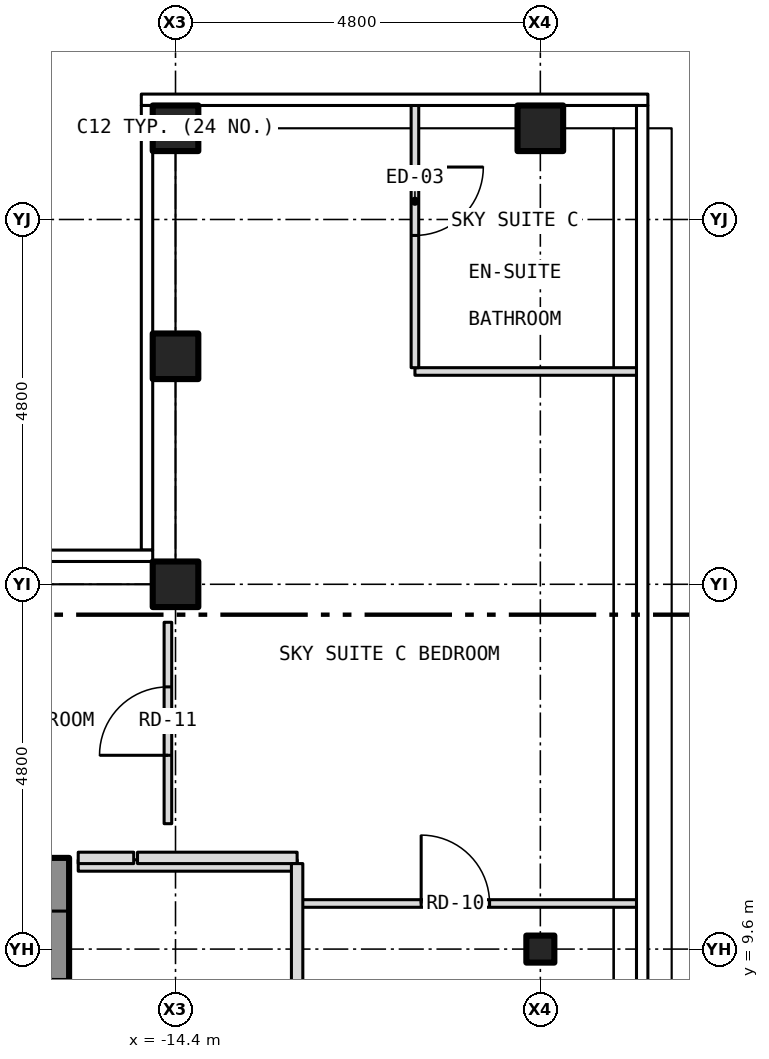
"""IFC4 building model, lengths in metres.
Left out: names, types, materials, properties, quantities, classifications, styles, units other than length and angle.
Written with IfcOpenShell. Run it as: python <this file> out.ifc"""

import sys

from ifc_helpers import new_model, si_unit, direction, frame, frame_2d, origin, origin_2d, place, context, subcontext, project, spatial, rectangle, hollow_rectangle, i_section, extrude, element, fill, save


model = new_model("IFC4")
c1 = context("Model", 3, precision=1e-05, world=origin(), true_north=direction((0.0, 1.0)))
c2 = subcontext(c1, "Body", "Model", "MODEL_VIEW")
j1 = project(units=[si_unit("LENGTHUNIT", "METRE"), si_unit("PLANEANGLEUNIT", "RADIAN")], contexts=[c1])
p1 = place(None, origin())
s1 = spatial("IfcSite", under=j1, at=p1, CompositionType="ELEMENT")
p2 = place(p1, origin())
s2 = spatial("IfcBuilding", under=s1, at=p2, CompositionType="ELEMENT")
p3 = place(p2, frame((0.0, 0.0, 272.5)))
s3 = spatial("IfcBuildingStorey", under=s2, at=p3, CompositionType="ELEMENT", Elevation=272.5)
for number, where, z_axis, x_axis in (
    (1, (-14.4, 20.4, -0.15), (0.0, 0.0, 1.0), (1.0, 0.0, 0.0)),
    (2, (-9.6, 20.4, -0.15), (0.0, 0.0, 1.0), (1.0, 0.0, 0.0)),
    (3, (-14.4, 14.4, -0.15), (0.0, 0.0, 1.0), (1.0, 0.0, 0.0)),
    (4, (-14.4, 17.4, -0.15), (0.0, 0.0, 1.0), (1.0, 0.0, 0.0)),
):
    element("IfcColumn", number, at=place(p3, frame(where, z_axis=z_axis, x_axis=x_axis)), inside=s3, PredefinedType="COLUMN", context=c2, shape_type="SweptSolid", body=[
        extrude(hollow_rectangle(XDim=0.6, YDim=0.6, WallThickness=0.03, at=origin_2d()), origin(), (0.0, 0.0, 1.0), 3.5),
    ])
p4 = place(p3, frame((-9.6, 9.6, -0.15), z_axis=(0.0, 0.0, 1.0), x_axis=(1.0, 0.0, 0.0)))
e5 = element("IfcColumn", 5, at=p4, inside=s3, PredefinedType="COLUMN", context=c2, shape_type="SweptSolid", body=[
    extrude(i_section(OverallWidth=0.368, OverallDepth=0.356, WebThickness=0.011, FlangeThickness=0.018, at=origin_2d()), origin(), (0.0, 0.0, 1.0), 3.5),
])
p5 = place(p3, frame((-16.0, -10.8, 0.0), z_axis=(0.0, 0.0, 1.0), x_axis=(0.0, 1.0, 0.0)))
e6 = element("IfcWall", 6, at=p5, inside=s3, PredefinedType="SHEAR", context=c2, shape_type="SweptSolid", body=[
    extrude(rectangle(XDim=21.6, YDim=0.4, at=frame_2d((10.8, 0.0))), origin(), (0.0, 0.0, 1.0), 3.25),
])
p6 = place(p5, frame((9.4, 0.0, 0.0)))
e7 = element("IfcOpeningElement", 7, at=p6, cuts=e6, PredefinedType="OPENING", context=c2, shape_type="SweptSolid", body=[
    extrude(rectangle(XDim=1.1, YDim=2.1, at=frame_2d((0.55, 1.05))), frame((0.0, 0.212, 0.0), z_axis=(0.0, -1.0, 0.0), x_axis=(1.0, 0.0, 0.0)), (0.0, 0.0, 1.0), 0.424),
])
p7 = place(p5, frame((11.5, 0.0, 0.0)))
e8 = element("IfcOpeningElement", 8, at=p7, cuts=e6, PredefinedType="OPENING", context=c2, shape_type="SweptSolid", body=[
    extrude(rectangle(XDim=1.1, YDim=2.1, at=frame_2d((0.55, 1.05))), frame((0.0, 0.212, 0.0), z_axis=(0.0, -1.0, 0.0), x_axis=(1.0, 0.0, 0.0)), (0.0, 0.0, 1.0), 0.424),
])
p8 = place(p5, frame((13.6, 0.0, 0.0)))
e9 = element("IfcOpeningElement", 9, at=p8, cuts=e6, PredefinedType="OPENING", context=c2, shape_type="SweptSolid", body=[
    extrude(rectangle(XDim=1.1, YDim=2.1, at=frame_2d((0.55, 1.05))), frame((0.0, 0.212, 0.0), z_axis=(0.0, -1.0, 0.0), x_axis=(1.0, 0.0, 0.0)), (0.0, 0.0, 1.0), 0.424),
])
p9 = place(p5, frame((15.7, 0.0, 0.0)))
e10 = element("IfcOpeningElement", 10, at=p9, cuts=e6, PredefinedType="OPENING", context=c2, shape_type="SweptSolid", body=[
    extrude(rectangle(XDim=1.1, YDim=2.1, at=frame_2d((0.55, 1.05))), frame((0.0, 0.212, 0.0), z_axis=(0.0, -1.0, 0.0), x_axis=(1.0, 0.0, 0.0)), (0.0, 0.0, 1.0), 0.424),
])
p10 = place(p5, frame((17.8, 0.0, 0.0)))
e11 = element("IfcOpeningElement", 11, at=p10, cuts=e6, PredefinedType="OPENING", context=c2, shape_type="SweptSolid", body=[
    extrude(rectangle(XDim=1.1, YDim=2.1, at=frame_2d((0.55, 1.05))), frame((0.0, 0.212, 0.0), z_axis=(0.0, -1.0, 0.0), x_axis=(1.0, 0.0, 0.0)), (0.0, 0.0, 1.0), 0.424),
])
p11 = place(p5, frame((0.458, 0.0, 0.0)))
e12 = element("IfcOpeningElement", 12, at=p11, cuts=e6, PredefinedType="OPENING", context=c2, shape_type="SweptSolid", body=[
    extrude(rectangle(XDim=1.1, YDim=2.1, at=frame_2d((0.55, 1.05))), frame((0.0, 0.212, 0.0), z_axis=(0.0, -1.0, 0.0), x_axis=(1.0, 0.0, 0.0)), (0.0, 0.0, 1.0), 0.424),
])
p12 = place(p5, frame((7.5, 0.0, 0.0)))
e13 = element("IfcOpeningElement", 13, at=p12, cuts=e6, PredefinedType="OPENING", context=c2, shape_type="SweptSolid", body=[
    extrude(rectangle(XDim=1.1, YDim=2.1, at=frame_2d((0.55, 1.05))), frame((0.0, 0.212, 0.0), z_axis=(0.0, -1.0, 0.0), x_axis=(1.0, 0.0, 0.0)), (0.0, 0.0, 1.0), 0.424),
])
p13 = place(p5, frame((20.0, 0.0, 0.0)))
e14 = element("IfcOpeningElement", 14, at=p13, cuts=e6, PredefinedType="OPENING", context=c2, shape_type="SweptSolid", body=[
    extrude(rectangle(XDim=0.9, YDim=2.1, at=frame_2d((0.45, 1.05))), frame((0.0, 0.212, 0.0), z_axis=(0.0, -1.0, 0.0), x_axis=(1.0, 0.0, 0.0)), (0.0, 0.0, 1.0), 0.424),
])
p14 = place(p3, frame((-12.8, 10.2, 0.0), z_axis=(0.0, 0.0, 1.0), x_axis=(1.0, 0.0, 0.0)))
e15 = element("IfcWall", 15, at=p14, inside=s3, PredefinedType="PARTITIONING", context=c2, shape_type="SweptSolid", body=[
    extrude(rectangle(XDim=4.495, YDim=0.1, at=frame_2d((2.248, 0.0))), origin(), (0.0, 0.0, 1.0), 3.35),
])
p15 = place(p14, frame((1.632, 0.0, 0.0)))
e16 = element("IfcOpeningElement", 16, at=p15, cuts=e15, PredefinedType="OPENING", context=c2, shape_type="SweptSolid", body=[
    extrude(rectangle(XDim=0.9, YDim=2.1, at=frame_2d((0.45, 1.05))), frame((0.0, 0.062, 0.0), z_axis=(0.0, -1.0, 0.0), x_axis=(1.0, 0.0, 0.0)), (0.0, 0.0, 1.0), 0.124),
])
p16 = place(p3, frame((-15.68, 10.7, 0.0), z_axis=(0.0, 0.0, 1.0), x_axis=(1.0, 0.0, 0.0)))
e17 = element("IfcWall", 17, at=p16, inside=s3, PredefinedType="PARTITIONING", context=c2, shape_type="SweptSolid", body=[
    extrude(rectangle(XDim=2.88, YDim=0.15, at=frame_2d((1.44, 0.0))), origin(), (0.0, 0.0, 1.0), 3.35),
])
p17 = place(p3, frame((-15.68, 10.8, 0.0), z_axis=(0.0, 0.0, 1.0), x_axis=(1.0, 0.0, 0.0)))
e18 = element("IfcWall", 18, at=p17, inside=s3, PredefinedType="PARTITIONING", context=c2, shape_type="SweptSolid", body=[
    extrude(rectangle(XDim=0.73, YDim=0.15, at=frame_2d((0.365, 0.0))), origin(), (0.0, 0.0, 1.0), 3.35),
])
p18 = place(p3, frame((-14.9, 10.8, 0.0), z_axis=(0.0, 0.0, 1.0), x_axis=(1.0, 0.0, 0.0)))
e19 = element("IfcWall", 19, at=p18, inside=s3, PredefinedType="PARTITIONING", context=c2, shape_type="SweptSolid", body=[
    extrude(rectangle(XDim=2.1, YDim=0.15, at=frame_2d((1.05, 0.0))), origin(), (0.0, 0.0, 1.0), 3.35),
])
p19 = place(p3, frame((-11.25, 17.2, 0.0), z_axis=(0.0, 0.0, 1.0), x_axis=(1.0, 0.0, 0.0)))
e20 = element("IfcWall", 20, at=p19, inside=s3, PredefinedType="PARTITIONING", context=c2, shape_type="SweptSolid", body=[
    extrude(rectangle(XDim=2.945, YDim=0.1, at=frame_2d((1.473, 0.0))), origin(), (0.0, 0.0, 1.0), 3.35),
])
p20 = place(p3, frame((-14.5, 11.25, 0.0), z_axis=(0.0, 0.0, 1.0), x_axis=(0.0, 1.0, 0.0)))
e21 = element("IfcWall", 21, at=p20, inside=s3, PredefinedType="PARTITIONING", context=c2, shape_type="SweptSolid", body=[
    extrude(rectangle(XDim=2.65, YDim=0.1, at=frame_2d((1.325, 0.0))), origin(), (0.0, 0.0, 1.0), 2.817),
])
p21 = place(p20, frame((0.9, 0.0, 0.0)))
e22 = element("IfcOpeningElement", 22, at=p21, cuts=e21, PredefinedType="OPENING", context=c2, shape_type="SweptSolid", body=[
    extrude(rectangle(XDim=0.9, YDim=2.1, at=frame_2d((0.45, 1.05))), frame((0.0, 0.062, 0.0), z_axis=(0.0, -1.0, 0.0), x_axis=(1.0, 0.0, 0.0)), (0.0, 0.0, 1.0), 0.124),
])
p22 = place(p3, frame((-12.8, 2.4, 0.0), z_axis=(0.0, 0.0, 1.0), x_axis=(0.0, 1.0, 0.0)))
e23 = element("IfcWall", 23, at=p22, inside=s3, PredefinedType="PARTITIONING", context=c2, shape_type="SweptSolid", body=[
    extrude(rectangle(XDim=8.325, YDim=0.15, at=frame_2d((4.163, 0.0))), origin(), (0.0, 0.0, 1.0), 3.35),
])
p23 = place(p22, frame((3.4, 0.0, 0.0)))
e24 = element("IfcOpeningElement", 24, at=p23, cuts=e23, PredefinedType="OPENING", context=c2, shape_type="SweptSolid", body=[
    extrude(rectangle(XDim=0.9, YDim=2.1, at=frame_2d((0.45, 1.05))), frame((0.0, 0.087, 0.0), z_axis=(0.0, -1.0, 0.0), x_axis=(1.0, 0.0, 0.0)), (0.0, 0.0, 1.0), 0.174),
])
p24 = place(p3, frame((-11.25, 17.25, 0.0), z_axis=(0.0, 0.0, 1.0), x_axis=(0.0, 1.0, 0.0)))
e25 = element("IfcWall", 25, at=p24, inside=s3, PredefinedType="PARTITIONING", context=c2, shape_type="SweptSolid", body=[
    extrude(rectangle(XDim=3.48, YDim=0.1, at=frame_2d((1.74, 0.0))), origin(), (0.0, 0.0, 1.0), 3.35),
])
p25 = place(p24, frame((1.74, 0.0, 0.0)))
e26 = element("IfcOpeningElement", 26, at=p25, cuts=e25, PredefinedType="OPENING", context=c2, shape_type="SweptSolid", body=[
    extrude(rectangle(XDim=0.9, YDim=2.1, at=frame_2d((0.45, 1.05))), frame((0.0, 0.062, 0.0), z_axis=(0.0, -1.0, 0.0), x_axis=(1.0, 0.0, 0.0)), (0.0, 0.0, 1.0), 0.124),
])
p26 = place(p13, origin())
e27 = element("IfcDoor", 27, at=p26, inside=s3, OperationType="SINGLE_SWING_LEFT", PredefinedType="DOOR", context=c2, shape_type="SweptSolid", body=[
    extrude(rectangle(XDim=0.9, YDim=2.1, at=frame_2d((0.45, 1.05))), frame((0.0, 0.025, 0.0), z_axis=(0.0, -1.0, 0.0), x_axis=(1.0, 0.0, 0.0)), (0.0, 0.0, 1.0), 0.05),
])
fill(e14, e27)
p27 = place(p15, origin())
e28 = element("IfcDoor", 28, at=p27, inside=s3, OperationType="SINGLE_SWING_LEFT", PredefinedType="DOOR", context=c2, shape_type="SweptSolid", body=[
    extrude(rectangle(XDim=0.9, YDim=2.1, at=frame_2d((0.45, 1.05))), frame((0.0, 0.025, 0.0), z_axis=(0.0, -1.0, 0.0), x_axis=(1.0, 0.0, 0.0)), (0.0, 0.0, 1.0), 0.05),
])
fill(e16, e28)
p28 = place(p25, origin())
e29 = element("IfcDoor", 29, at=p28, inside=s3, OperationType="SINGLE_SWING_RIGHT", PredefinedType="DOOR", context=c2, shape_type="SweptSolid", body=[
    extrude(rectangle(XDim=0.9, YDim=2.1, at=frame_2d((0.45, 1.05))), frame((0.0, 0.025, 0.0), z_axis=(0.0, -1.0, 0.0), x_axis=(1.0, 0.0, 0.0)), (0.0, 0.0, 1.0), 0.05),
])
fill(e26, e29)
p29 = place(p21, origin())
e30 = element("IfcDoor", 30, at=p29, inside=s3, OperationType="SINGLE_SWING_LEFT", PredefinedType="DOOR", context=c2, shape_type="SweptSolid", body=[
    extrude(rectangle(XDim=0.9, YDim=2.1, at=frame_2d((0.45, 1.05))), frame((0.0, 0.025, 0.0), z_axis=(0.0, -1.0, 0.0), x_axis=(1.0, 0.0, 0.0)), (0.0, 0.0, 1.0), 0.05),
])
fill(e22, e30)
save(model, sys.argv[1])
